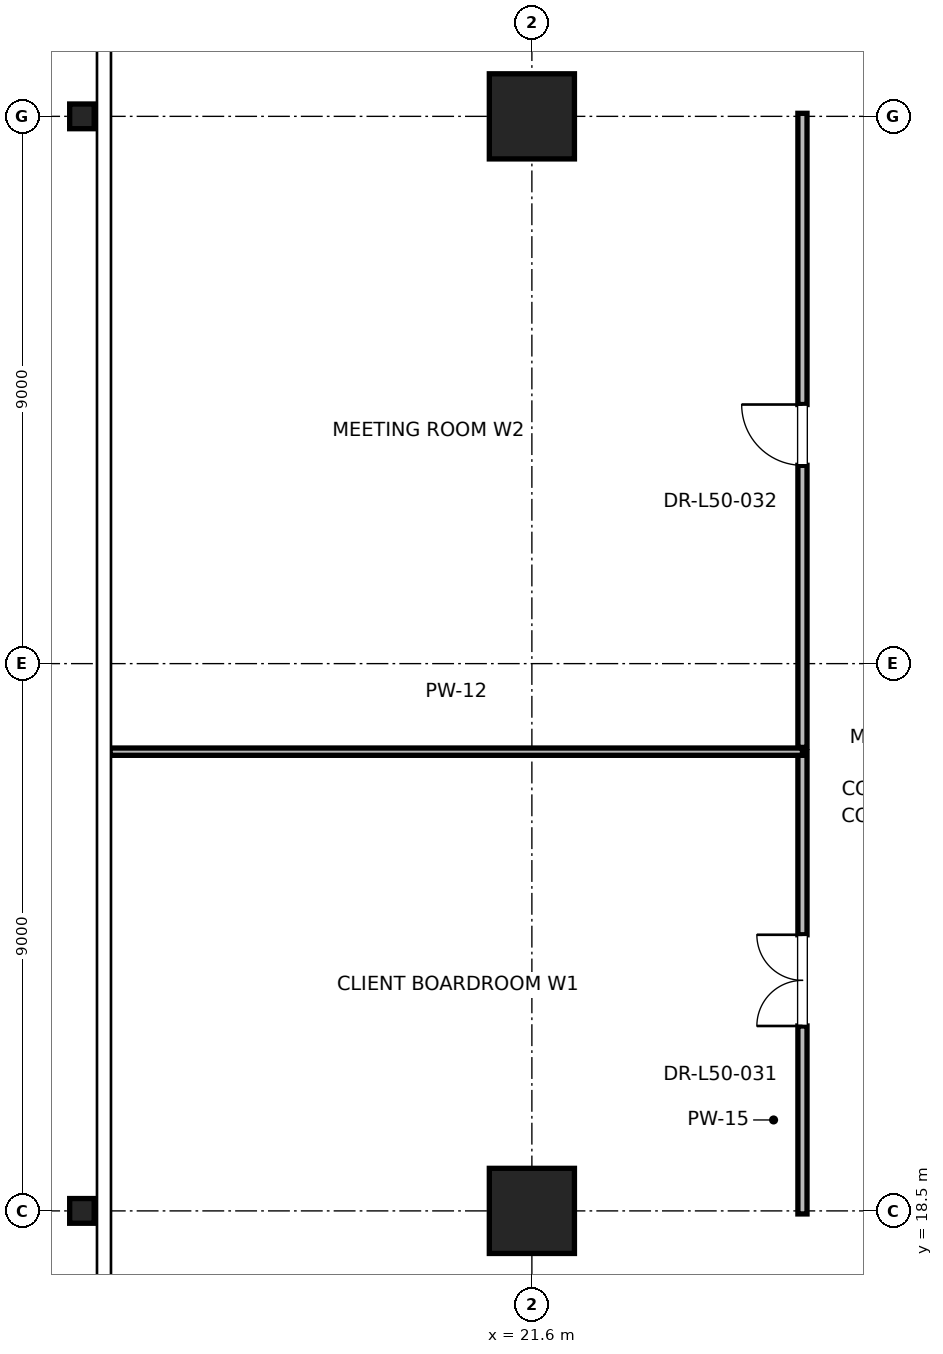
"""IFC4 building model, lengths in metres.
Left out: names, types, materials, properties, quantities, classifications, styles, units other than length and angle.
Written with IfcOpenShell. Run it as: python <this file> out.ifc"""

import sys

from ifc_helpers import new_model, si_unit, direction, frame, frame_2d, origin, origin_2d, place, context, subcontext, project, spatial, rectangle, i_section, extrude, element, fill, save


model = new_model("IFC4")
c1 = context("Model", 3, precision=1e-05, world=origin(), true_north=direction((0.0, 1.0)))
c2 = subcontext(c1, "Body", "Model", "MODEL_VIEW")
j1 = project(units=[si_unit("LENGTHUNIT", "METRE"), si_unit("PLANEANGLEUNIT", "RADIAN")], contexts=[c1])
p1 = place(None, origin())
s1 = spatial("IfcSite", under=j1, at=p1, CompositionType="ELEMENT")
p2 = place(p1, origin())
s2 = spatial("IfcBuilding", under=s1, at=p2, CompositionType="ELEMENT")
p3 = place(p2, frame((0.0, 0.0, 217.2)))
s3 = spatial("IfcBuildingStorey", under=s2, at=p3, CompositionType="ELEMENT", Elevation=217.2)
for number, where, z_axis, x_axis in (
    (1, (21.6, 18.5, 0.0), (0.0, 0.0, 1.0), (1.0, 0.0, 0.0)),
    (2, (21.6, 36.5, 0.0), (0.0, 0.0, 1.0), (1.0, 0.0, 0.0)),
):
    element("IfcColumn", number, at=place(p3, frame(where, z_axis=z_axis, x_axis=x_axis)), inside=s3, PredefinedType="COLUMN", context=c2, shape_type="SweptSolid", body=[
        extrude(rectangle(XDim=1.4, YDim=1.4, at=origin_2d()), origin(), (0.0, 0.0, 1.0), 4.0),
    ])
for number, where, z_axis, x_axis in (
    (3, (14.2, 18.5, 0.0), (0.0, 0.0, 1.0), (1.0, 0.0, 0.0)),
    (4, (14.2, 36.5, 0.0), (0.0, 0.0, 1.0), (1.0, 0.0, 0.0)),
):
    element("IfcColumn", number, at=place(p3, frame(where, z_axis=z_axis, x_axis=x_axis)), inside=s3, PredefinedType="COLUMN", context=c2, shape_type="SweptSolid", body=[
        extrude(i_section(OverallWidth=0.403, OverallDepth=0.406, WebThickness=0.027, FlangeThickness=0.043, FilletRadius=0.015, at=origin_2d()), origin(), (0.0, 0.0, 1.0), 4.0),
    ])
p4 = place(p3, frame((26.05, 18.45, 0.0), z_axis=(0.0, 0.0, 1.0), x_axis=(0.0, 1.0, 0.0)))
e5 = element("IfcWall", 5, at=p4, inside=s3, PredefinedType="PARTITIONING", context=c2, shape_type="SweptSolid", body=[
    extrude(rectangle(XDim=7.602, YDim=0.15, at=frame_2d((3.801, 0.0))), origin(), (0.0, 0.0, 1.0), 2.85),
])
p5 = place(p4, frame((3.091, 0.0, 0.0)))
e6 = element("IfcOpeningElement", 6, at=p5, cuts=e5, PredefinedType="OPENING", context=c2, shape_type="SweptSolid", body=[
    extrude(rectangle(XDim=1.5, YDim=2.25, at=frame_2d((0.75, 1.125))), frame((0.0, 0.075, 0.0), z_axis=(0.0, -1.0, 0.0), x_axis=(1.0, 0.0, 0.0)), (0.0, 0.0, 1.0), 0.15),
])
p6 = place(p3, frame((14.663, 26.052, 0.0), z_axis=(0.0, 0.0, 1.0), x_axis=(1.0, 0.0, 0.0)))
e7 = element("IfcWall", 7, at=p6, inside=s3, PredefinedType="PARTITIONING", context=c2, shape_type="SweptSolid", body=[
    extrude(rectangle(XDim=11.387, YDim=0.12, at=frame_2d((5.694, 0.0))), origin(), (0.0, 0.0, 1.0), 2.85),
])
p7 = place(p3, frame((26.05, 26.122, 0.0), z_axis=(0.0, 0.0, 1.0), x_axis=(0.0, 1.0, 0.0)))
e8 = element("IfcWall", 8, at=p7, inside=s3, PredefinedType="PARTITIONING", context=c2, shape_type="SweptSolid", body=[
    extrude(rectangle(XDim=10.428, YDim=0.15, at=frame_2d((5.214, 0.0))), origin(), (0.0, 0.0, 1.0), 2.85),
])
p8 = place(p7, frame((4.639, 0.0, 0.0)))
e9 = element("IfcOpeningElement", 9, at=p8, cuts=e8, PredefinedType="OPENING", context=c2, shape_type="SweptSolid", body=[
    extrude(rectangle(XDim=1.0, YDim=2.15, at=frame_2d((0.5, 1.075))), frame((0.0, 0.075, 0.0), z_axis=(0.0, -1.0, 0.0), x_axis=(1.0, 0.0, 0.0)), (0.0, 0.0, 1.0), 0.15),
])
p9 = place(p5, origin())
e10 = element("IfcDoor", 10, at=p9, inside=s3, OperationType="DOUBLE_DOOR_SINGLE_SWING", PredefinedType="DOOR", context=c2, shape_type="SweptSolid", body=[
    extrude(rectangle(XDim=1.5, YDim=2.25, at=frame_2d((0.75, 1.125))), frame((0.0, 0.025, 0.0), z_axis=(0.0, -1.0, 0.0), x_axis=(1.0, 0.0, 0.0)), (0.0, 0.0, 1.0), 0.05),
])
fill(e6, e10)
p10 = place(p8, origin())
e11 = element("IfcDoor", 11, at=p10, inside=s3, OperationType="SINGLE_SWING_RIGHT", PredefinedType="DOOR", context=c2, shape_type="SweptSolid", body=[
    extrude(rectangle(XDim=1.0, YDim=2.15, at=frame_2d((0.5, 1.075))), frame((0.0, 0.025, 0.0), z_axis=(0.0, -1.0, 0.0), x_axis=(1.0, 0.0, 0.0)), (0.0, 0.0, 1.0), 0.05),
])
fill(e9, e11)
save(model, sys.argv[1])
